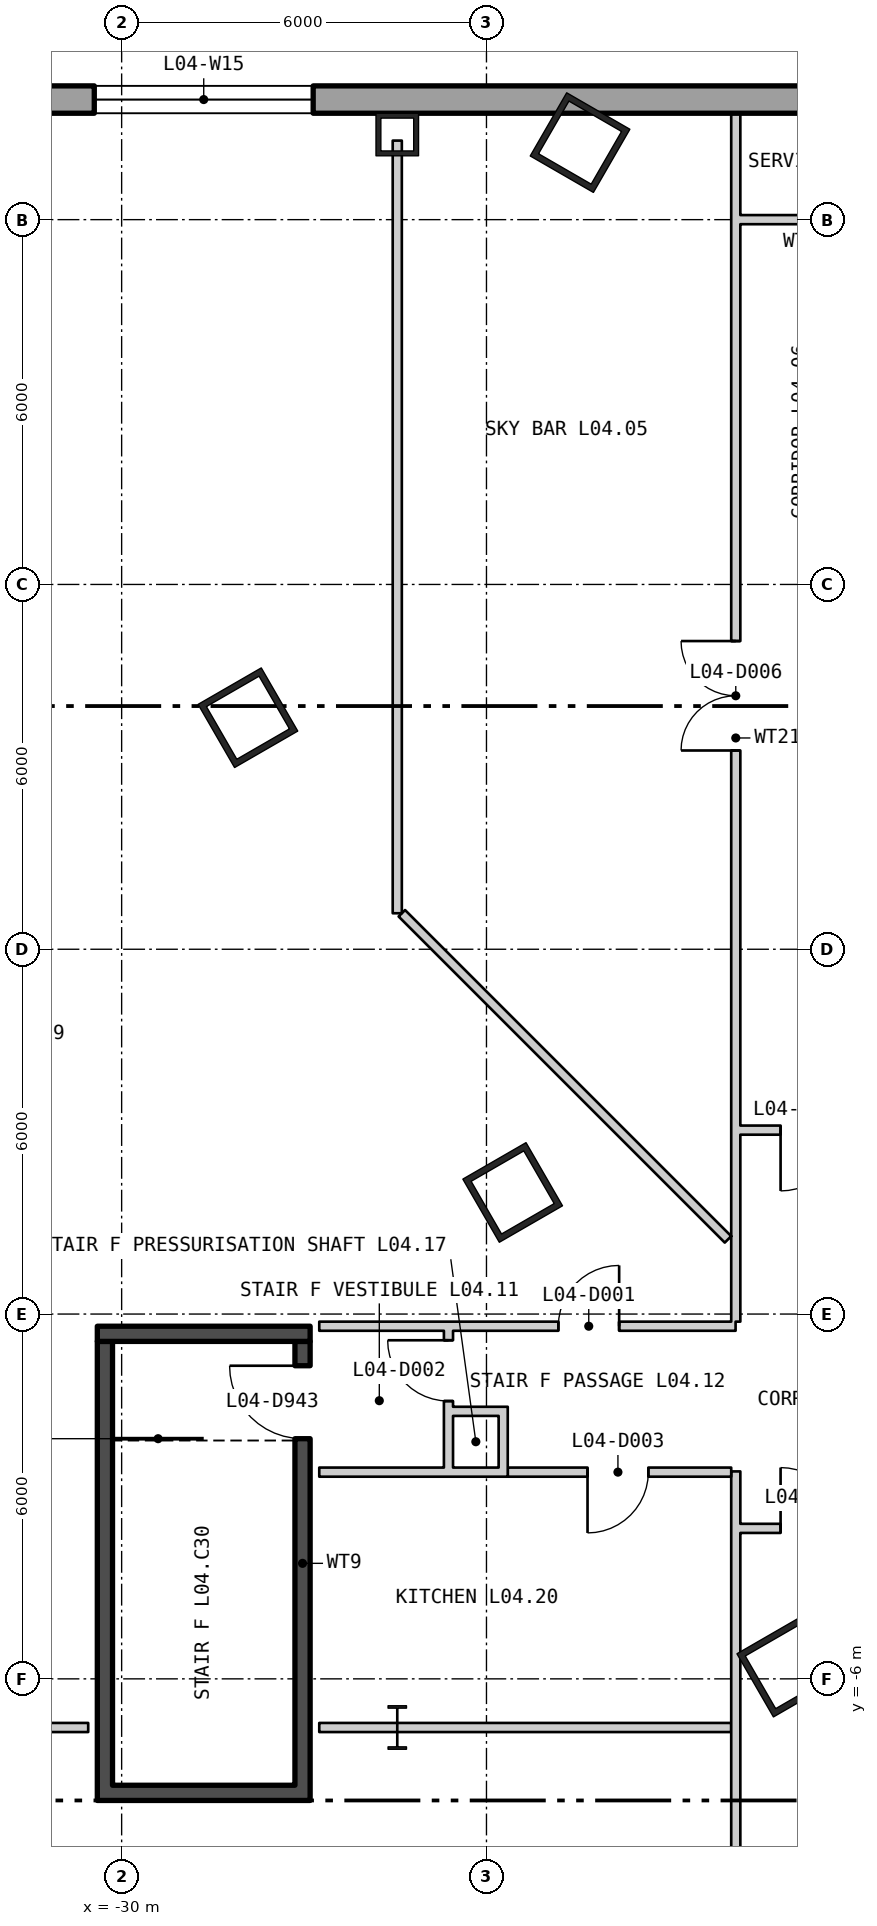
"""IFC4 building model, lengths in metres.
Left out: names, types, materials, properties, quantities, classifications, styles, units other than length and angle.
Written with IfcOpenShell. Run it as: python <this file> out.ifc"""

import sys

from ifc_helpers import new_model, si_unit, direction, frame, frame_2d, origin, origin_2d, place, context, subcontext, project, spatial, polyline, rectangle, hollow_rectangle, i_section, outline, extrude, element, fill, save


model = new_model("IFC4")
c1 = context("Model", 3, precision=1e-05, world=origin(), true_north=direction((0.0, 1.0)))
c2 = subcontext(c1, "Body", "Model", "MODEL_VIEW")
j1 = project(units=[si_unit("LENGTHUNIT", "METRE"), si_unit("PLANEANGLEUNIT", "RADIAN")], contexts=[c1])
p1 = place(None, origin())
s1 = spatial("IfcSite", under=j1, at=p1, CompositionType="ELEMENT")
p2 = place(p1, origin())
s2 = spatial("IfcBuilding", under=s1, at=p2, CompositionType="ELEMENT")
p3 = place(p2, frame((0.0, 0.0, 23.7)))
s3 = spatial("IfcBuildingStorey", under=s2, at=p3, CompositionType="ELEMENT", Elevation=23.7)
for number, where, z_axis, x_axis in (
    (1, (-22.461, 19.267, 0.0), (0.0, 0.0, 1.0), (-0.5, -0.866, 0.0)),
    (2, (-27.923, 9.808, 0.0), (0.0, 0.0, 1.0), (0.5, -0.866, 0.0)),
    (3, (-23.569, 2.0, 0.0), (0.0, 0.0, 1.0), (0.5, -0.866, 0.0)),
    (4, (-19.061, -5.807, 0.0), (0.0, 0.0, 1.0), (0.5, -0.866, 0.0)),
):
    element("IfcColumn", number, at=place(p3, frame(where, z_axis=z_axis, x_axis=x_axis)), inside=s3, PredefinedType="COLUMN", context=c2, shape_type="SweptSolid", body=[
        extrude(hollow_rectangle(XDim=1.2, YDim=1.2, WallThickness=0.1, at=origin_2d()), origin(), (0.0, 0.0, 1.0), 5.1),
    ])
p4 = place(p3, frame((-25.467, 19.4, 0.0), z_axis=(0.0, 0.0, 1.0), x_axis=(-1.0, 0.0, 0.0)))
e5 = element("IfcColumn", 5, at=p4, inside=s3, PredefinedType="COLUMN", context=c2, shape_type="SweptSolid", body=[
    extrude(hollow_rectangle(XDim=0.7, YDim=0.7, WallThickness=0.08, at=origin_2d()), origin(), (0.0, 0.0, 1.0), 4.85),
])
p5 = place(p3, frame((-25.467, -6.8, 0.0), z_axis=(0.0, 0.0, 1.0), x_axis=(1.0, 0.0, 0.0)))
e6 = element("IfcColumn", 6, at=p5, inside=s3, PredefinedType="COLUMN", context=c2, shape_type="SweptSolid", body=[
    extrude(i_section(OverallWidth=0.304, OverallDepth=0.716, WebThickness=0.021, FlangeThickness=0.04, at=origin_2d()), origin(), (0.0, 0.0, 1.0), 4.85),
])
p6 = place(p3, frame((38.775, 19.975, -0.4), z_axis=(0.0, 0.0, 1.0), x_axis=(-1.0, 0.0, 0.0)))
e7 = element("IfcWall", 7, at=p6, inside=s3, PredefinedType="SOLIDWALL", context=c2, shape_type="SweptSolid", body=[
    extrude(outline(polyline([(-0.225, -0.225), (77.775, -0.225), (77.325, 0.225), (0.225, 0.225), (-0.225, -0.225)])), origin(), (0.0, 0.0, 1.0), 5.1),
])
p7 = place(p6, frame((1.958, 0.0, 1.3)))
e8 = element("IfcOpeningElement", 8, at=p7, cuts=e7, PredefinedType="OPENING", context=c2, shape_type="SweptSolid", body=[
    extrude(rectangle(XDim=3.6, YDim=3.2, at=frame_2d((1.8, 1.6))), frame((0.0, 0.235, 0.0), z_axis=(0.0, -1.0, 0.0), x_axis=(1.0, 0.0, 0.0)), (0.0, 0.0, 1.0), 0.47),
])
p8 = place(p6, frame((8.325, 0.0, 1.3)))
e9 = element("IfcOpeningElement", 9, at=p8, cuts=e7, PredefinedType="OPENING", context=c2, shape_type="SweptSolid", body=[
    extrude(rectangle(XDim=3.6, YDim=3.2, at=frame_2d((1.8, 1.6))), frame((0.0, 0.235, 0.0), z_axis=(0.0, -1.0, 0.0), x_axis=(1.0, 0.0, 0.0)), (0.0, 0.0, 1.0), 0.47),
])
p9 = place(p6, frame((20.952, 0.0, 1.3)))
e10 = element("IfcOpeningElement", 10, at=p9, cuts=e7, PredefinedType="OPENING", context=c2, shape_type="SweptSolid", body=[
    extrude(rectangle(XDim=3.6, YDim=3.2, at=frame_2d((1.8, 1.6))), frame((0.0, 0.235, 0.0), z_axis=(0.0, -1.0, 0.0), x_axis=(1.0, 0.0, 0.0)), (0.0, 0.0, 1.0), 0.47),
])
p10 = place(p6, frame((27.425, 0.0, 1.3)))
e11 = element("IfcOpeningElement", 11, at=p10, cuts=e7, PredefinedType="OPENING", context=c2, shape_type="SweptSolid", body=[
    extrude(rectangle(XDim=3.6, YDim=3.2, at=frame_2d((1.8, 1.6))), frame((0.0, 0.235, 0.0), z_axis=(0.0, -1.0, 0.0), x_axis=(1.0, 0.0, 0.0)), (0.0, 0.0, 1.0), 0.47),
])
p11 = place(p6, frame((46.525, 0.0, 1.3)))
e12 = element("IfcOpeningElement", 12, at=p11, cuts=e7, PredefinedType="OPENING", context=c2, shape_type="SweptSolid", body=[
    extrude(rectangle(XDim=3.6, YDim=3.2, at=frame_2d((1.8, 1.6))), frame((0.0, 0.235, 0.0), z_axis=(0.0, -1.0, 0.0), x_axis=(1.0, 0.0, 0.0)), (0.0, 0.0, 1.0), 0.47),
])
p12 = place(p6, frame((52.998, 0.0, 1.3)))
e13 = element("IfcOpeningElement", 13, at=p12, cuts=e7, PredefinedType="OPENING", context=c2, shape_type="SweptSolid", body=[
    extrude(rectangle(XDim=3.6, YDim=3.2, at=frame_2d((1.8, 1.6))), frame((0.0, 0.235, 0.0), z_axis=(0.0, -1.0, 0.0), x_axis=(1.0, 0.0, 0.0)), (0.0, 0.0, 1.0), 0.47),
])
p13 = place(p6, frame((65.625, 0.0, 1.3)))
e14 = element("IfcOpeningElement", 14, at=p13, cuts=e7, PredefinedType="OPENING", context=c2, shape_type="SweptSolid", body=[
    extrude(rectangle(XDim=3.6, YDim=3.2, at=frame_2d((1.8, 1.6))), frame((0.0, 0.235, 0.0), z_axis=(0.0, -1.0, 0.0), x_axis=(1.0, 0.0, 0.0)), (0.0, 0.0, 1.0), 0.47),
])
p14 = place(p6, frame((71.992, 0.0, 1.3)))
e15 = element("IfcOpeningElement", 15, at=p14, cuts=e7, PredefinedType="OPENING", context=c2, shape_type="SweptSolid", body=[
    extrude(rectangle(XDim=3.6, YDim=3.2, at=frame_2d((1.8, 1.6))), frame((0.0, 0.235, 0.0), z_axis=(0.0, -1.0, 0.0), x_axis=(1.0, 0.0, 0.0)), (0.0, 0.0, 1.0), 0.47),
])
p15 = place(p3, frame((-30.275, -7.75, 0.0), z_axis=(0.0, 0.0, 1.0), x_axis=(0.0, 1.0, 0.0)))
e16 = element("IfcWall", 16, at=p15, inside=s3, PredefinedType="SHEAR", context=c2, shape_type="SweptSolid", body=[
    extrude(rectangle(XDim=7.3, YDim=0.25, at=frame_2d((3.65, 0.0))), origin(), (0.0, 0.0, 1.0), 4.85),
])
p16 = place(p3, frame((-27.025, -7.75, 0.0), z_axis=(0.0, 0.0, 1.0), x_axis=(0.0, 1.0, 0.0)))
e17 = element("IfcWall", 17, at=p16, inside=s3, PredefinedType="SHEAR", context=c2, shape_type="SweptSolid", body=[
    extrude(rectangle(XDim=7.3, YDim=0.25, at=frame_2d((3.65, 0.0))), origin(), (0.0, 0.0, 1.0), 4.85),
])
p17 = place(p16, frame((5.7, 0.0, 0.0)))
e18 = element("IfcOpeningElement", 18, at=p17, cuts=e17, PredefinedType="OPENING", context=c2, shape_type="SweptSolid", body=[
    extrude(rectangle(XDim=1.2, YDim=2.1, at=frame_2d((0.6, 1.05))), frame((0.0, 0.135, 0.0), z_axis=(0.0, -1.0, 0.0), x_axis=(1.0, 0.0, 0.0)), (0.0, 0.0, 1.0), 0.27),
])
for number, where, z_axis, x_axis in (
    (19, (-30.4, -7.875, 0.0), (0.0, 0.0, 1.0), (1.0, 0.0, 0.0)),
    (20, (-30.4, -0.325, 0.0), (0.0, 0.0, 1.0), (1.0, 0.0, 0.0)),
):
    element("IfcWall", number, at=place(p3, frame(where, z_axis=z_axis, x_axis=x_axis)), inside=s3, PredefinedType="SHEAR", context=c2, shape_type="SweptSolid", body=[
        extrude(rectangle(XDim=3.5, YDim=0.25, at=frame_2d((1.75, 0.0))), origin(), (0.0, 0.0, 1.0), 4.85),
    ])
p18 = place(p3, frame((-38.1, -6.8, 0.0), z_axis=(0.0, 0.0, 1.0), x_axis=(1.0, 0.0, 0.0)))
e21 = element("IfcWall", 21, at=p18, inside=s3, PredefinedType="PARTITIONING", context=c2, shape_type="SweptSolid", body=[
    extrude(rectangle(XDim=7.55, YDim=0.15, at=frame_2d((3.775, 0.0))), origin(), (0.0, 0.0, 1.0), 4.06),
])
p19 = place(p3, frame((-26.75, -6.8, 0.0), z_axis=(0.0, 0.0, 1.0), x_axis=(1.0, 0.0, 0.0)))
e22 = element("IfcWall", 22, at=p19, inside=s3, PredefinedType="PARTITIONING", context=c2, shape_type="SweptSolid", body=[
    extrude(rectangle(XDim=1.283, YDim=0.15, at=frame_2d((0.641, 0.0))), origin(), (0.0, 0.0, 1.0), 4.06),
])
p20 = place(p3, frame((-25.467, -6.8, 0.0), z_axis=(0.0, 0.0, 1.0), x_axis=(1.0, 0.0, 0.0)))
e23 = element("IfcWall", 23, at=p20, inside=s3, PredefinedType="PARTITIONING", context=c2, shape_type="SweptSolid", body=[
    extrude(rectangle(XDim=5.492, YDim=0.15, at=frame_2d((2.746, 0.0))), origin(), (0.0, 0.0, 1.0), 4.16),
])
p21 = place(p3, frame((-26.75, -2.6, 0.0), z_axis=(0.0, 0.0, 1.0), x_axis=(1.0, 0.0, 0.0)))
e24 = element("IfcWall", 24, at=p21, inside=s3, PredefinedType="PARTITIONING", context=c2, shape_type="SweptSolid", body=[
    extrude(rectangle(XDim=2.05, YDim=0.15, at=frame_2d((1.025, 0.0))), origin(), (0.0, 0.0, 1.0), 4.85),
])
p22 = place(p3, frame((-26.75, -0.2, 0.0), z_axis=(0.0, 0.0, 1.0), x_axis=(1.0, 0.0, 0.0)))
e25 = element("IfcWall", 25, at=p22, inside=s3, PredefinedType="PARTITIONING", context=c2, shape_type="SweptSolid", body=[
    extrude(rectangle(XDim=6.847, YDim=0.15, at=frame_2d((3.424, 0.0))), origin(), (0.0, 0.0, 1.0), 4.85),
])
p23 = place(p22, frame((3.932, 0.0, 0.0)))
e26 = element("IfcOpeningElement", 26, at=p23, cuts=e25, PredefinedType="OPENING", context=c2, shape_type="SweptSolid", body=[
    extrude(rectangle(XDim=1.0, YDim=2.1, at=frame_2d((0.5, 1.05))), frame((0.0, 0.085, 0.0), z_axis=(0.0, -1.0, 0.0), x_axis=(1.0, 0.0, 0.0)), (0.0, 0.0, 1.0), 0.17),
])
p24 = place(p3, frame((-25.467, 6.592, 0.0), z_axis=(0.0, 0.0, 1.0), x_axis=(0.0, 1.0, 0.0)))
e27 = element("IfcWall", 27, at=p24, inside=s3, PredefinedType="PARTITIONING", context=c2, shape_type="SweptSolid", body=[
    extrude(rectangle(XDim=7.936, YDim=0.15, at=frame_2d((3.968, 0.0))), origin(), (0.0, 0.0, 1.0), 4.85),
])
p25 = place(p3, frame((-25.467, 14.528, 0.0), z_axis=(0.0, 0.0, 1.0), x_axis=(0.0, 1.0, 0.0)))
e28 = element("IfcWall", 28, at=p25, inside=s3, PredefinedType="PARTITIONING", context=c2, shape_type="SweptSolid", body=[
    extrude(rectangle(XDim=4.772, YDim=0.15, at=frame_2d((2.386, 0.0))), origin(), (0.0, 0.0, 1.0), 4.25),
])
p26 = place(p3, frame((-25.392, 6.592, 0.0), z_axis=(0.0, 0.0, 1.0), x_axis=(0.707106781187, -0.707106781187, 0.0)))
e29 = element("IfcWall", 29, at=p26, inside=s3, PredefinedType="PARTITIONING", context=c2, shape_type="SweptSolid", body=[
    extrude(rectangle(XDim=7.586, YDim=0.15, at=frame_2d((3.793, 0.0))), origin(), (0.0, 0.0, 1.0), 4.85),
])
p27 = place(p3, frame((-24.625, -2.675, 0.0), z_axis=(0.0, 0.0, 1.0), x_axis=(0.0, 1.0, 0.0)))
e30 = element("IfcWall", 30, at=p27, inside=s3, PredefinedType="PARTITIONING", context=c2, shape_type="SweptSolid", body=[
    extrude(rectangle(XDim=1.087, YDim=0.15, at=frame_2d((0.543, 0.0))), origin(), (0.0, 0.0, 1.0), 4.85),
])
p28 = place(p3, frame((-24.625, -1.588, 0.0), z_axis=(0.0, 0.0, 1.0), x_axis=(0.0, 1.0, 0.0)))
e31 = element("IfcWall", 31, at=p28, inside=s3, PredefinedType="PARTITIONING", context=c2, shape_type="SweptSolid", body=[
    extrude(rectangle(XDim=1.313, YDim=0.15, at=frame_2d((0.656, 0.0))), origin(), (0.0, 0.0, 1.0), 4.85),
])
p29 = place(p28, frame((0.157, 0.0, 0.0)))
e32 = element("IfcOpeningElement", 32, at=p29, cuts=e31, PredefinedType="OPENING", context=c2, shape_type="SweptSolid", body=[
    extrude(rectangle(XDim=1.0, YDim=2.1, at=frame_2d((0.5, 1.05))), frame((0.0, 0.085, 0.0), z_axis=(0.0, -1.0, 0.0), x_axis=(1.0, 0.0, 0.0)), (0.0, 0.0, 1.0), 0.17),
])
for number, where, z_axis, x_axis in (
    (33, (-24.55, -2.6, 0.0), (0.0, 0.0, 1.0), (1.0, 0.0, 0.0)),
    (34, (-24.55, -1.6, 0.0), (0.0, 0.0, 1.0), (1.0, 0.0, 0.0)),
):
    element("IfcWall", number, at=place(p3, frame(where, z_axis=z_axis, x_axis=x_axis)), inside=s3, PredefinedType="PARTITIONING", context=c2, shape_type="SweptSolid", body=[
        extrude(rectangle(XDim=0.75, YDim=0.15, at=frame_2d((0.375, 0.0))), origin(), (0.0, 0.0, 1.0), 4.85),
    ])
p30 = place(p3, frame((-23.725, -2.675, 0.0), z_axis=(0.0, 0.0, 1.0), x_axis=(0.0, 1.0, 0.0)))
e35 = element("IfcWall", 35, at=p30, inside=s3, PredefinedType="PARTITIONING", context=c2, shape_type="SweptSolid", body=[
    extrude(rectangle(XDim=1.15, YDim=0.15, at=frame_2d((0.575, 0.0))), origin(), (0.0, 0.0, 1.0), 4.85),
])
p31 = place(p3, frame((-23.65, -2.6, 0.0), z_axis=(0.0, 0.0, 1.0), x_axis=(1.0, 0.0, 0.0)))
e36 = element("IfcWall", 36, at=p31, inside=s3, PredefinedType="PARTITIONING", context=c2, shape_type="SweptSolid", body=[
    extrude(rectangle(XDim=3.675, YDim=0.15, at=frame_2d((1.837, 0.0))), origin(), (0.0, 0.0, 1.0), 4.85),
])
p32 = place(p31, frame((1.312, 0.0, 0.0)))
e37 = element("IfcOpeningElement", 37, at=p32, cuts=e36, PredefinedType="OPENING", context=c2, shape_type="SweptSolid", body=[
    extrude(rectangle(XDim=1.0, YDim=2.1, at=frame_2d((0.5, 1.05))), frame((0.0, 0.085, 0.0), z_axis=(0.0, -1.0, 0.0), x_axis=(1.0, 0.0, 0.0)), (0.0, 0.0, 1.0), 0.17),
])
p33 = place(p3, frame((-19.975, 18.0, 0.0), z_axis=(0.0, 0.0, 1.0), x_axis=(1.0, 0.0, 0.0)))
e38 = element("IfcWall", 38, at=p33, inside=s3, PredefinedType="PARTITIONING", context=c2, shape_type="SweptSolid", body=[
    extrude(rectangle(XDim=2.475, YDim=0.15, at=frame_2d((1.238, 0.0))), origin(), (0.0, 0.0, 1.0), 4.3),
])
p34 = place(p3, frame((-19.9, -23.775, 0.0), z_axis=(0.0, 0.0, 1.0), x_axis=(0.0, 1.0, 0.0)))
e39 = element("IfcWall", 39, at=p34, inside=s3, PredefinedType="PARTITIONING", context=c2, shape_type="SweptSolid", body=[
    extrude(rectangle(XDim=21.187, YDim=0.15, at=frame_2d((10.594, 0.0))), origin(), (0.0, 0.0, 1.0), 4.85),
])
p35 = place(p34, frame((3.548, 0.0, 0.0)))
e40 = element("IfcOpeningElement", 40, at=p35, cuts=e39, PredefinedType="OPENING", context=c2, shape_type="SweptSolid", body=[
    extrude(rectangle(XDim=1.8, YDim=2.1, at=frame_2d((0.9, 1.05))), frame((0.0, 0.085, 0.0), z_axis=(0.0, -1.0, 0.0), x_axis=(1.0, 0.0, 0.0)), (0.0, 0.0, 1.0), 0.17),
])
p36 = place(p34, frame((12.399, 0.0, 0.0)))
e41 = element("IfcOpeningElement", 41, at=p36, cuts=e39, PredefinedType="OPENING", context=c2, shape_type="SweptSolid", body=[
    extrude(rectangle(XDim=1.0, YDim=2.1, at=frame_2d((0.5, 1.05))), frame((0.0, 0.085, 0.0), z_axis=(0.0, -1.0, 0.0), x_axis=(1.0, 0.0, 0.0)), (0.0, 0.0, 1.0), 0.17),
])
p37 = place(p3, frame((-19.9, -0.125, 0.0), z_axis=(0.0, 0.0, 1.0), x_axis=(0.0, 1.0, 0.0)))
e42 = element("IfcWall", 42, at=p37, inside=s3, PredefinedType="PARTITIONING", context=c2, shape_type="SweptSolid", body=[
    extrude(rectangle(XDim=1.15, YDim=0.15, at=frame_2d((0.575, 0.0))), origin(), (0.0, 0.0, 1.0), 4.85),
])
p38 = place(p3, frame((-19.9, 1.025, 0.0), z_axis=(0.0, 0.0, 1.0), x_axis=(0.0, 1.0, 0.0)))
e43 = element("IfcWall", 43, at=p38, inside=s3, PredefinedType="PARTITIONING", context=c2, shape_type="SweptSolid", body=[
    extrude(rectangle(XDim=16.9, YDim=0.15, at=frame_2d((8.45, 0.0))), origin(), (0.0, 0.0, 1.0), 4.85),
])
p39 = place(p38, frame((8.244, 0.0, 0.0)))
e44 = element("IfcOpeningElement", 44, at=p39, cuts=e43, PredefinedType="OPENING", context=c2, shape_type="SweptSolid", body=[
    extrude(rectangle(XDim=1.8, YDim=2.1, at=frame_2d((0.9, 1.05))), frame((0.0, 0.085, 0.0), z_axis=(0.0, -1.0, 0.0), x_axis=(1.0, 0.0, 0.0)), (0.0, 0.0, 1.0), 0.17),
])
p40 = place(p3, frame((-19.9, 18.075, 0.0), z_axis=(0.0, 0.0, 1.0), x_axis=(0.0, 1.0, 0.0)))
e45 = element("IfcWall", 45, at=p40, inside=s3, PredefinedType="PARTITIONING", context=c2, shape_type="SweptSolid", body=[
    extrude(rectangle(XDim=1.675, YDim=0.15, at=frame_2d((0.838, 0.0))), origin(), (0.0, 0.0, 1.0), 4.85),
])
p41 = place(p3, frame((-19.825, -3.525, 0.0), z_axis=(0.0, 0.0, 1.0), x_axis=(1.0, 0.0, 0.0)))
e46 = element("IfcWall", 46, at=p41, inside=s3, PredefinedType="PARTITIONING", context=c2, shape_type="SweptSolid", body=[
    extrude(rectangle(XDim=2.325, YDim=0.15, at=frame_2d((1.163, 0.0))), origin(), (0.0, 0.0, 1.0), 4.85),
])
p42 = place(p41, frame((0.662, 0.0, 0.0)))
e47 = element("IfcOpeningElement", 47, at=p42, cuts=e46, PredefinedType="OPENING", context=c2, shape_type="SweptSolid", body=[
    extrude(rectangle(XDim=1.0, YDim=2.1, at=frame_2d((0.5, 1.05))), frame((0.0, 0.085, 0.0), z_axis=(0.0, -1.0, 0.0), x_axis=(1.0, 0.0, 0.0)), (0.0, 0.0, 1.0), 0.17),
])
p43 = place(p3, frame((-19.825, 3.025, 0.0), z_axis=(0.0, 0.0, 1.0), x_axis=(1.0, 0.0, 0.0)))
e48 = element("IfcWall", 48, at=p43, inside=s3, PredefinedType="PARTITIONING", context=c2, shape_type="SweptSolid", body=[
    extrude(rectangle(XDim=2.325, YDim=0.15, at=frame_2d((1.163, 0.0))), origin(), (0.0, 0.0, 1.0), 4.3),
])
p44 = place(p43, frame((0.662, 0.0, 0.0)))
e49 = element("IfcOpeningElement", 49, at=p44, cuts=e48, PredefinedType="OPENING", context=c2, shape_type="SweptSolid", body=[
    extrude(rectangle(XDim=1.0, YDim=2.1, at=frame_2d((0.5, 1.05))), frame((0.0, 0.085, 0.0), z_axis=(0.0, -1.0, 0.0), x_axis=(1.0, 0.0, 0.0)), (0.0, 0.0, 1.0), 0.17),
])
p45 = place(p13, origin())
e50 = element("IfcWindow", 50, at=p45, inside=s3, PartitioningType="SINGLE_PANEL", PredefinedType="WINDOW", context=c2, shape_type="SweptSolid", body=[
    extrude(rectangle(XDim=3.6, YDim=3.2, at=frame_2d((1.8, 1.6))), frame((0.0, 0.105, 0.0), z_axis=(0.0, -1.0, 0.0), x_axis=(1.0, 0.0, 0.0)), (0.0, 0.0, 1.0), 0.06),
])
fill(e14, e50)
p46 = place(p17, origin())
e51 = element("IfcDoor", 51, at=p46, inside=s3, OperationType="SINGLE_SWING_LEFT", PredefinedType="DOOR", context=c2, shape_type="SweptSolid", body=[
    extrude(rectangle(XDim=1.2, YDim=2.1, at=frame_2d((0.6, 1.05))), frame((0.0, 0.025, 0.0), z_axis=(0.0, -1.0, 0.0), x_axis=(1.0, 0.0, 0.0)), (0.0, 0.0, 1.0), 0.05),
])
fill(e18, e51)
p47 = place(p23, origin())
e52 = element("IfcDoor", 52, at=p47, inside=s3, OperationType="SINGLE_SWING_LEFT", PredefinedType="DOOR", context=c2, shape_type="SweptSolid", body=[
    extrude(rectangle(XDim=1.0, YDim=2.1, at=frame_2d((0.5, 1.05))), frame((0.0, 0.025, 0.0), z_axis=(0.0, -1.0, 0.0), x_axis=(1.0, 0.0, 0.0)), (0.0, 0.0, 1.0), 0.05),
])
fill(e26, e52)
p48 = place(p29, origin())
e53 = element("IfcDoor", 53, at=p48, inside=s3, OperationType="SINGLE_SWING_LEFT", PredefinedType="DOOR", context=c2, shape_type="SweptSolid", body=[
    extrude(rectangle(XDim=1.0, YDim=2.1, at=frame_2d((0.5, 1.05))), frame((0.0, 0.025, 0.0), z_axis=(0.0, -1.0, 0.0), x_axis=(1.0, 0.0, 0.0)), (0.0, 0.0, 1.0), 0.05),
])
fill(e32, e53)
p49 = place(p32, origin())
e54 = element("IfcDoor", 54, at=p49, inside=s3, OperationType="SINGLE_SWING_LEFT", PredefinedType="DOOR", context=c2, shape_type="SweptSolid", body=[
    extrude(rectangle(XDim=1.0, YDim=2.1, at=frame_2d((0.5, 1.05))), frame((0.0, 0.025, 0.0), z_axis=(0.0, -1.0, 0.0), x_axis=(1.0, 0.0, 0.0)), (0.0, 0.0, 1.0), 0.05),
])
fill(e37, e54)
p50 = place(p39, origin())
e55 = element("IfcDoor", 55, at=p50, inside=s3, OperationType="DOUBLE_DOOR_SINGLE_SWING", PredefinedType="DOOR", context=c2, shape_type="SweptSolid", body=[
    extrude(rectangle(XDim=1.8, YDim=2.1, at=frame_2d((0.9, 1.05))), frame((0.0, 0.025, 0.0), z_axis=(0.0, -1.0, 0.0), x_axis=(1.0, 0.0, 0.0)), (0.0, 0.0, 1.0), 0.05),
])
fill(e44, e55)
p51 = place(p42, origin())
e56 = element("IfcDoor", 56, at=p51, inside=s3, OperationType="SINGLE_SWING_RIGHT", PredefinedType="DOOR", context=c2, shape_type="SweptSolid", body=[
    extrude(rectangle(XDim=1.0, YDim=2.1, at=frame_2d((0.5, 1.05))), frame((0.0, 0.025, 0.0), z_axis=(0.0, -1.0, 0.0), x_axis=(1.0, 0.0, 0.0)), (0.0, 0.0, 1.0), 0.05),
])
fill(e47, e56)
p52 = place(p44, origin())
e57 = element("IfcDoor", 57, at=p52, inside=s3, OperationType="SINGLE_SWING_LEFT", PredefinedType="DOOR", context=c2, shape_type="SweptSolid", body=[
    extrude(rectangle(XDim=1.0, YDim=2.1, at=frame_2d((0.5, 1.05))), frame((0.0, 0.025, 0.0), z_axis=(0.0, -1.0, 0.0), x_axis=(1.0, 0.0, 0.0)), (0.0, 0.0, 1.0), 0.05),
])
fill(e49, e57)
save(model, sys.argv[1])
